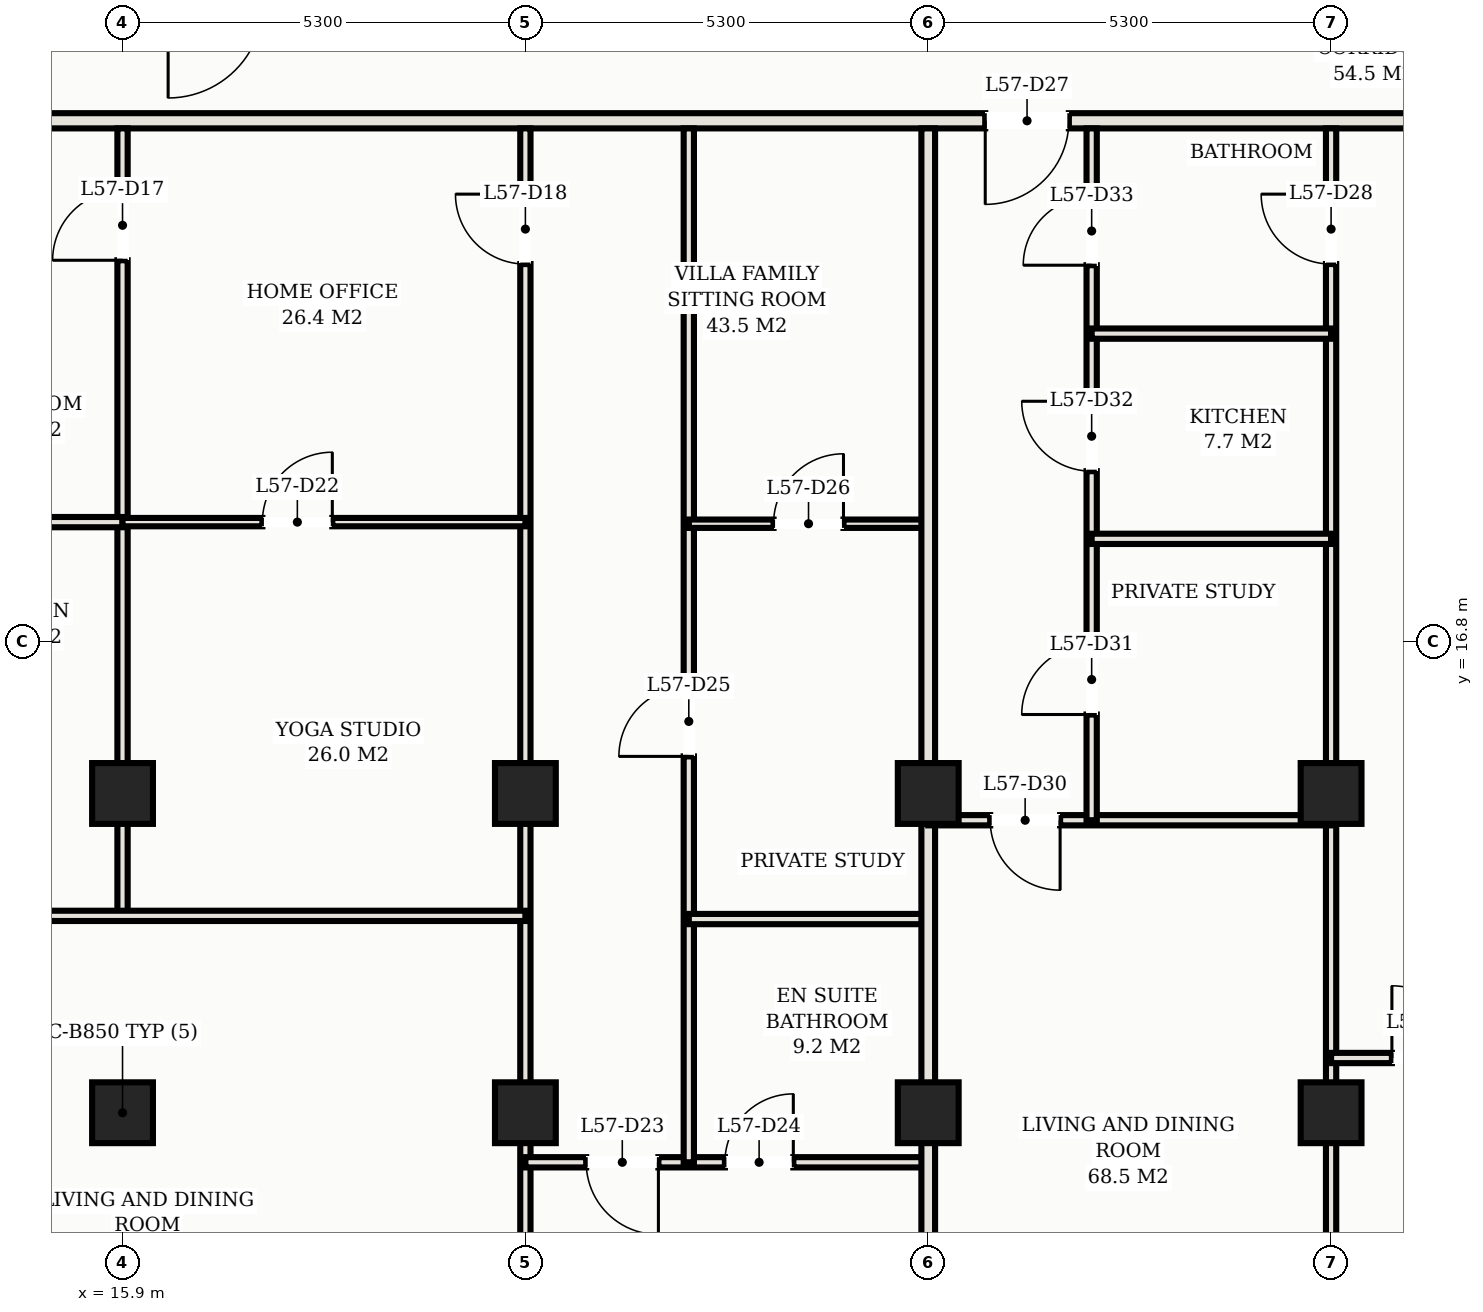
"""IFC4 building model, lengths in metres.
Left out: names, types, materials, properties, quantities, classifications, styles, units other than length and angle.
Written with IfcOpenShell. Run it as: python <this file> out.ifc"""

import sys

from ifc_helpers import new_model, si_unit, direction, frame, frame_2d, origin, origin_2d, place, context, subcontext, project, spatial, rectangle, hollow_rectangle, extrude, element, fill, save


model = new_model("IFC4")
c1 = context("Model", 3, precision=1e-05, world=origin(), true_north=direction((0.0, 1.0)))
c2 = subcontext(c1, "Body", "Model", "MODEL_VIEW")
j1 = project(units=[si_unit("LENGTHUNIT", "METRE"), si_unit("PLANEANGLEUNIT", "RADIAN")], contexts=[c1])
p1 = place(None, origin())
s1 = spatial("IfcSite", under=j1, at=p1, CompositionType="ELEMENT")
p2 = place(p1, origin())
s2 = spatial("IfcBuilding", under=s1, at=p2, CompositionType="ELEMENT")
p3 = place(p2, frame((0.0, 0.0, 209.9)))
s3 = spatial("IfcBuildingStorey", under=s2, at=p3, CompositionType="ELEMENT", Elevation=209.9)
for number, where, z_axis, x_axis in (
    (1, (15.9, 14.8, 0.0), (0.0, 0.0, 1.0), (1.0, 0.0, 0.0)),
    (2, (15.9, 10.6, 0.0), (0.0, 0.0, 1.0), (1.0, 0.0, 0.0)),
    (3, (21.2, 14.8, 0.0), (0.0, 0.0, 1.0), (1.0, 0.0, 0.0)),
    (4, (21.2, 10.6, 0.0), (0.0, 0.0, 1.0), (1.0, 0.0, 0.0)),
    (5, (26.5, 14.8, 0.0), (0.0, 0.0, 1.0), (1.0, 0.0, 0.0)),
    (6, (26.5, 10.6, 0.0), (0.0, 0.0, 1.0), (1.0, 0.0, 0.0)),
    (7, (31.8, 14.8, 0.0), (0.0, 0.0, 1.0), (1.0, 0.0, 0.0)),
    (8, (31.8, 10.6, 0.0), (0.0, 0.0, 1.0), (1.0, 0.0, 0.0)),
):
    element("IfcColumn", number, at=place(p3, frame(where, z_axis=z_axis, x_axis=x_axis)), inside=s3, PredefinedType="COLUMN", context=c2, shape_type="SweptSolid", body=[
        extrude(hollow_rectangle(XDim=0.8, YDim=0.8, WallThickness=0.028, at=origin_2d()), origin(), (0.0, 0.0, 1.0), 3.3),
    ])
p4 = place(p3, frame((6.72, 23.65, 0.0), z_axis=(0.0, 0.0, 1.0), x_axis=(1.0, 0.0, 0.0)))
e9 = element("IfcWall", 9, at=p4, inside=s3, PredefinedType="PARTITIONING", context=c2, shape_type="SweptSolid", body=[
    extrude(rectangle(XDim=39.56, YDim=0.2, at=frame_2d((19.78, 0.0))), origin(), (0.0, 0.0, 1.0), 2.43),
])
p5 = place(p4, frame((4.63, 0.0, 0.0)))
e10 = element("IfcOpeningElement", 10, at=p5, cuts=e9, PredefinedType="OPENING", context=c2, shape_type="SweptSolid", body=[
    extrude(rectangle(XDim=1.1, YDim=2.25, at=frame_2d((0.55, 1.125))), frame((0.0, 0.11, 0.0), z_axis=(0.0, -1.0, 0.0), x_axis=(1.0, 0.0, 0.0)), (0.0, 0.0, 1.0), 0.22),
])
p6 = place(p4, frame((20.53, 0.0, 0.0)))
e11 = element("IfcOpeningElement", 11, at=p6, cuts=e9, PredefinedType="OPENING", context=c2, shape_type="SweptSolid", body=[
    extrude(rectangle(XDim=1.1, YDim=2.25, at=frame_2d((0.55, 1.125))), frame((0.0, 0.11, 0.0), z_axis=(0.0, -1.0, 0.0), x_axis=(1.0, 0.0, 0.0)), (0.0, 0.0, 1.0), 0.22),
])
p7 = place(p4, frame((2.085, 0.0, 0.0)))
e12 = element("IfcOpeningElement", 12, at=p7, cuts=e9, PredefinedType="OPENING", context=c2, shape_type="SweptSolid", body=[
    extrude(rectangle(XDim=0.92, YDim=2.15, at=frame_2d((0.46, 1.075))), frame((0.0, 0.11, 0.0), z_axis=(0.0, -1.0, 0.0), x_axis=(1.0, 0.0, 0.0)), (0.0, 0.0, 1.0), 0.22),
])
p8 = place(p4, frame((36.555, 0.0, 0.0)))
e13 = element("IfcOpeningElement", 13, at=p8, cuts=e9, PredefinedType="OPENING", context=c2, shape_type="SweptSolid", body=[
    extrude(rectangle(XDim=0.92, YDim=2.15, at=frame_2d((0.46, 1.075))), frame((0.0, 0.11, 0.0), z_axis=(0.0, -1.0, 0.0), x_axis=(1.0, 0.0, 0.0)), (0.0, 0.0, 1.0), 0.22),
])
p9 = place(p3, frame((15.9, 14.8, 0.0), z_axis=(0.0, 0.0, 1.0), x_axis=(0.0, 1.0, 0.0)))
e14 = element("IfcWall", 14, at=p9, inside=s3, PredefinedType="PARTITIONING", context=c2, shape_type="SweptSolid", body=[
    extrude(rectangle(XDim=8.75, YDim=0.135, at=frame_2d((4.375, 0.0))), origin(), (0.0, 0.0, 1.0), 2.43),
])
p10 = place(p9, frame((7.015, 0.0, 0.0)))
e15 = element("IfcOpeningElement", 15, at=p10, cuts=e14, PredefinedType="OPENING", context=c2, shape_type="SweptSolid", body=[
    extrude(rectangle(XDim=0.92, YDim=2.15, at=frame_2d((0.46, 1.075))), frame((0.0, 0.078, 0.0), z_axis=(0.0, -1.0, 0.0), x_axis=(1.0, 0.0, 0.0)), (0.0, 0.0, 1.0), 0.155),
])
p11 = place(p3, frame((21.2, 5.331, 0.0), z_axis=(0.0, 0.0, 1.0), x_axis=(0.0, 1.0, 0.0)))
e16 = element("IfcWall", 16, at=p11, inside=s3, PredefinedType="PARTITIONING", context=c2, shape_type="SweptSolid", body=[
    extrude(rectangle(XDim=18.219, YDim=0.135, at=frame_2d((9.109, 0.0))), origin(), (0.0, 0.0, 1.0), 2.43),
])
p12 = place(p11, frame((16.434, 0.0, 0.0)))
e17 = element("IfcOpeningElement", 17, at=p12, cuts=e16, PredefinedType="OPENING", context=c2, shape_type="SweptSolid", body=[
    extrude(rectangle(XDim=0.92, YDim=2.15, at=frame_2d((0.46, 1.075))), frame((0.0, 0.078, 0.0), z_axis=(0.0, -1.0, 0.0), x_axis=(1.0, 0.0, 0.0)), (0.0, 0.0, 1.0), 0.155),
])
p13 = place(p3, frame((15.9, 13.19, 0.0), z_axis=(0.0, 0.0, 1.0), x_axis=(0.0, 1.0, 0.0)))
e18 = element("IfcWall", 18, at=p13, inside=s3, PredefinedType="PARTITIONING", context=c2, shape_type="SweptSolid", body=[
    extrude(rectangle(XDim=1.61, YDim=0.135, at=frame_2d((0.805, 0.0))), origin(), (0.0, 0.0, 1.0), 2.43),
])
p14 = place(p3, frame((10.6, 13.19, 0.0), z_axis=(0.0, 0.0, 1.0), x_axis=(1.0, 0.0, 0.0)))
e19 = element("IfcWall", 19, at=p14, inside=s3, PredefinedType="PARTITIONING", context=c2, shape_type="SweptSolid", body=[
    extrude(rectangle(XDim=10.6, YDim=0.135, at=frame_2d((5.3, 0.0))), origin(), (0.0, 0.0, 1.0), 2.43),
])
p15 = place(p14, frame((0.425, 0.0, 0.0)))
e20 = element("IfcOpeningElement", 20, at=p15, cuts=e19, PredefinedType="OPENING", context=c2, shape_type="SweptSolid", body=[
    extrude(rectangle(XDim=1.5, YDim=2.25, at=frame_2d((0.75, 1.125))), frame((0.0, 0.078, 0.0), z_axis=(0.0, -1.0, 0.0), x_axis=(1.0, 0.0, 0.0)), (0.0, 0.0, 1.0), 0.155),
])
p16 = place(p3, frame((12.95, 18.37, 0.0), z_axis=(0.0, 0.0, 1.0), x_axis=(1.0, 0.0, 0.0)))
e21 = element("IfcWall", 21, at=p16, inside=s3, PredefinedType="PARTITIONING", context=c2, shape_type="SweptSolid", body=[
    extrude(rectangle(XDim=2.95, YDim=0.135, at=frame_2d((1.475, 0.0))), origin(), (0.0, 0.0, 1.0), 2.43),
])
p17 = place(p3, frame((15.9, 18.37, 0.0), z_axis=(0.0, 0.0, 1.0), x_axis=(1.0, 0.0, 0.0)))
e22 = element("IfcWall", 22, at=p17, inside=s3, PredefinedType="MOVABLE", context=c2, shape_type="SweptSolid", body=[
    extrude(rectangle(XDim=5.3, YDim=0.11, at=frame_2d((2.65, 0.0))), origin(), (0.0, 0.0, 1.0), 2.43),
])
p18 = place(p17, frame((1.84, 0.0, 0.0)))
e23 = element("IfcOpeningElement", 23, at=p18, cuts=e22, PredefinedType="OPENING", context=c2, shape_type="SweptSolid", body=[
    extrude(rectangle(XDim=0.92, YDim=2.15, at=frame_2d((0.46, 1.075))), frame((0.0, 0.065, 0.0), z_axis=(0.0, -1.0, 0.0), x_axis=(1.0, 0.0, 0.0)), (0.0, 0.0, 1.0), 0.13),
])
p19 = place(p3, frame((21.2, 9.948, 0.0), z_axis=(0.0, 0.0, 1.0), x_axis=(1.0, 0.0, 0.0)))
e24 = element("IfcWall", 24, at=p19, inside=s3, PredefinedType="PARTITIONING", context=c2, shape_type="SweptSolid", body=[
    extrude(rectangle(XDim=5.3, YDim=0.135, at=frame_2d((2.65, 0.0))), origin(), (0.0, 0.0, 1.0), 2.43),
])
p20 = place(p19, frame((0.8, 0.0, 0.0)))
e25 = element("IfcOpeningElement", 25, at=p20, cuts=e24, PredefinedType="OPENING", context=c2, shape_type="SweptSolid", body=[
    extrude(rectangle(XDim=0.95, YDim=2.15, at=frame_2d((0.475, 1.075))), frame((0.0, 0.078, 0.0), z_axis=(0.0, -1.0, 0.0), x_axis=(1.0, 0.0, 0.0)), (0.0, 0.0, 1.0), 0.155),
])
p21 = place(p19, frame((2.625, 0.0, 0.0)))
e26 = element("IfcOpeningElement", 26, at=p21, cuts=e24, PredefinedType="OPENING", context=c2, shape_type="SweptSolid", body=[
    extrude(rectangle(XDim=0.9, YDim=2.15, at=frame_2d((0.45, 1.075))), frame((0.0, 0.078, 0.0), z_axis=(0.0, -1.0, 0.0), x_axis=(1.0, 0.0, 0.0)), (0.0, 0.0, 1.0), 0.155),
])
p22 = place(p3, frame((23.35, 9.948, 0.0), z_axis=(0.0, 0.0, 1.0), x_axis=(0.0, 1.0, 0.0)))
e27 = element("IfcWall", 27, at=p22, inside=s3, PredefinedType="PARTITIONING", context=c2, shape_type="SweptSolid", body=[
    extrude(rectangle(XDim=13.602, YDim=0.135, at=frame_2d((6.801, 0.0))), origin(), (0.0, 0.0, 1.0), 2.43),
])
p23 = place(p22, frame((5.34, 0.0, 0.0)))
e28 = element("IfcOpeningElement", 28, at=p23, cuts=e27, PredefinedType="OPENING", context=c2, shape_type="SweptSolid", body=[
    extrude(rectangle(XDim=0.92, YDim=2.15, at=frame_2d((0.46, 1.075))), frame((0.0, 0.078, 0.0), z_axis=(0.0, -1.0, 0.0), x_axis=(1.0, 0.0, 0.0)), (0.0, 0.0, 1.0), 0.155),
])
p24 = place(p3, frame((23.35, 13.148, 0.0), z_axis=(0.0, 0.0, 1.0), x_axis=(1.0, 0.0, 0.0)))
e29 = element("IfcWall", 29, at=p24, inside=s3, PredefinedType="PARTITIONING", context=c2, shape_type="SweptSolid", body=[
    extrude(rectangle(XDim=3.15, YDim=0.135, at=frame_2d((1.575, 0.0))), origin(), (0.0, 0.0, 1.0), 2.43),
])
p25 = place(p3, frame((23.35, 18.349, 0.0), z_axis=(0.0, 0.0, 1.0), x_axis=(1.0, 0.0, 0.0)))
e30 = element("IfcWall", 30, at=p25, inside=s3, PredefinedType="MOVABLE", context=c2, shape_type="SweptSolid", body=[
    extrude(rectangle(XDim=3.15, YDim=0.11, at=frame_2d((1.575, 0.0))), origin(), (0.0, 0.0, 1.0), 2.43),
])
p26 = place(p25, frame((1.115, 0.0, 0.0)))
e31 = element("IfcOpeningElement", 31, at=p26, cuts=e30, PredefinedType="OPENING", context=c2, shape_type="SweptSolid", body=[
    extrude(rectangle(XDim=0.92, YDim=2.15, at=frame_2d((0.46, 1.075))), frame((0.0, 0.065, 0.0), z_axis=(0.0, -1.0, 0.0), x_axis=(1.0, 0.0, 0.0)), (0.0, 0.0, 1.0), 0.13),
])
p27 = place(p3, frame((26.5, 4.42, 0.0), z_axis=(0.0, 0.0, 1.0), x_axis=(0.0, 1.0, 0.0)))
e32 = element("IfcWall", 32, at=p27, inside=s3, PredefinedType="PARTITIONING", context=c2, shape_type="SweptSolid", body=[
    extrude(rectangle(XDim=19.13, YDim=0.18, at=frame_2d((9.565, 0.0))), origin(), (0.0, 0.0, 1.0), 2.43),
])
p28 = place(p3, frame((31.8, 5.331, 0.0), z_axis=(0.0, 0.0, 1.0), x_axis=(0.0, 1.0, 0.0)))
e33 = element("IfcWall", 33, at=p28, inside=s3, PredefinedType="PARTITIONING", context=c2, shape_type="SweptSolid", body=[
    extrude(rectangle(XDim=18.219, YDim=0.135, at=frame_2d((9.109, 0.0))), origin(), (0.0, 0.0, 1.0), 2.43),
])
p29 = place(p28, frame((16.434, 0.0, 0.0)))
e34 = element("IfcOpeningElement", 34, at=p29, cuts=e33, PredefinedType="OPENING", context=c2, shape_type="SweptSolid", body=[
    extrude(rectangle(XDim=0.92, YDim=2.15, at=frame_2d((0.46, 1.075))), frame((0.0, 0.078, 0.0), z_axis=(0.0, -1.0, 0.0), x_axis=(1.0, 0.0, 0.0)), (0.0, 0.0, 1.0), 0.155),
])
p30 = place(p3, frame((26.5, 14.448, 0.0), z_axis=(0.0, 0.0, 1.0), x_axis=(1.0, 0.0, 0.0)))
e35 = element("IfcWall", 35, at=p30, inside=s3, PredefinedType="PARTITIONING", context=c2, shape_type="SweptSolid", body=[
    extrude(rectangle(XDim=5.3, YDim=0.135, at=frame_2d((2.65, 0.0))), origin(), (0.0, 0.0, 1.0), 2.43),
])
p31 = place(p30, frame((0.815, 0.0, 0.0)))
e36 = element("IfcOpeningElement", 36, at=p31, cuts=e35, PredefinedType="OPENING", context=c2, shape_type="SweptSolid", body=[
    extrude(rectangle(XDim=0.92, YDim=2.15, at=frame_2d((0.46, 1.075))), frame((0.0, 0.078, 0.0), z_axis=(0.0, -1.0, 0.0), x_axis=(1.0, 0.0, 0.0)), (0.0, 0.0, 1.0), 0.155),
])
p32 = place(p3, frame((28.65, 14.448, 0.0), z_axis=(0.0, 0.0, 1.0), x_axis=(0.0, 1.0, 0.0)))
e37 = element("IfcWall", 37, at=p32, inside=s3, PredefinedType="PARTITIONING", context=c2, shape_type="SweptSolid", body=[
    extrude(rectangle(XDim=9.102, YDim=0.135, at=frame_2d((4.551, 0.0))), origin(), (0.0, 0.0, 1.0), 2.43),
])
p33 = place(p32, frame((1.391, 0.0, 0.0)))
e38 = element("IfcOpeningElement", 38, at=p33, cuts=e37, PredefinedType="OPENING", context=c2, shape_type="SweptSolid", body=[
    extrude(rectangle(XDim=0.92, YDim=2.15, at=frame_2d((0.46, 1.075))), frame((0.0, 0.078, 0.0), z_axis=(0.0, -1.0, 0.0), x_axis=(1.0, 0.0, 0.0)), (0.0, 0.0, 1.0), 0.155),
])
p34 = place(p32, frame((4.592, 0.0, 0.0)))
e39 = element("IfcOpeningElement", 39, at=p34, cuts=e37, PredefinedType="OPENING", context=c2, shape_type="SweptSolid", body=[
    extrude(rectangle(XDim=0.92, YDim=2.15, at=frame_2d((0.46, 1.075))), frame((0.0, 0.078, 0.0), z_axis=(0.0, -1.0, 0.0), x_axis=(1.0, 0.0, 0.0)), (0.0, 0.0, 1.0), 0.155),
])
p35 = place(p32, frame((7.302, 0.0, 0.0)))
e40 = element("IfcOpeningElement", 40, at=p35, cuts=e37, PredefinedType="OPENING", context=c2, shape_type="SweptSolid", body=[
    extrude(rectangle(XDim=0.9, YDim=2.15, at=frame_2d((0.45, 1.075))), frame((0.0, 0.078, 0.0), z_axis=(0.0, -1.0, 0.0), x_axis=(1.0, 0.0, 0.0)), (0.0, 0.0, 1.0), 0.155),
])
for number, where, z_axis, x_axis in (
    (41, (28.65, 18.15, 0.0), (0.0, 0.0, 1.0), (1.0, 0.0, 0.0)),
    (42, (28.65, 20.85, 0.0), (0.0, 0.0, 1.0), (1.0, 0.0, 0.0)),
):
    element("IfcWall", number, at=place(p3, frame(where, z_axis=z_axis, x_axis=x_axis)), inside=s3, PredefinedType="PARTITIONING", context=c2, shape_type="SweptSolid", body=[
        extrude(rectangle(XDim=3.15, YDim=0.135, at=frame_2d((1.575, 0.0))), origin(), (0.0, 0.0, 1.0), 2.43),
    ])
p36 = place(p3, frame((31.8, 11.32, 0.0), z_axis=(0.0, 0.0, 1.0), x_axis=(1.0, 0.0, 0.0)))
e43 = element("IfcWall", 43, at=p36, inside=s3, PredefinedType="PARTITIONING", context=c2, shape_type="SweptSolid", body=[
    extrude(rectangle(XDim=5.3, YDim=0.135, at=frame_2d((2.65, 0.0))), origin(), (0.0, 0.0, 1.0), 2.43),
])
p37 = place(p36, frame((0.8, 0.0, 0.0)))
e44 = element("IfcOpeningElement", 44, at=p37, cuts=e43, PredefinedType="OPENING", context=c2, shape_type="SweptSolid", body=[
    extrude(rectangle(XDim=0.95, YDim=2.15, at=frame_2d((0.475, 1.075))), frame((0.0, 0.078, 0.0), z_axis=(0.0, -1.0, 0.0), x_axis=(1.0, 0.0, 0.0)), (0.0, 0.0, 1.0), 0.155),
])
p38 = place(p36, frame((2.875, 0.0, 0.0)))
e45 = element("IfcOpeningElement", 45, at=p38, cuts=e43, PredefinedType="OPENING", context=c2, shape_type="SweptSolid", body=[
    extrude(rectangle(XDim=0.9, YDim=2.15, at=frame_2d((0.45, 1.075))), frame((0.0, 0.078, 0.0), z_axis=(0.0, -1.0, 0.0), x_axis=(1.0, 0.0, 0.0)), (0.0, 0.0, 1.0), 0.155),
])
p39 = place(p10, origin())
e46 = element("IfcDoor", 46, at=p39, inside=s3, OperationType="SINGLE_SWING_LEFT", PredefinedType="DOOR", context=c2, shape_type="SweptSolid", body=[
    extrude(rectangle(XDim=0.92, YDim=2.15, at=frame_2d((0.46, 1.075))), frame((0.0, 0.025, 0.0), z_axis=(0.0, -1.0, 0.0), x_axis=(1.0, 0.0, 0.0)), (0.0, 0.0, 1.0), 0.05),
])
fill(e15, e46)
p40 = place(p12, origin())
e47 = element("IfcDoor", 47, at=p40, inside=s3, OperationType="SINGLE_SWING_RIGHT", PredefinedType="DOOR", context=c2, shape_type="SweptSolid", body=[
    extrude(rectangle(XDim=0.92, YDim=2.15, at=frame_2d((0.46, 1.075))), frame((0.0, 0.025, 0.0), z_axis=(0.0, -1.0, 0.0), x_axis=(1.0, 0.0, 0.0)), (0.0, 0.0, 1.0), 0.05),
])
fill(e17, e47)
p41 = place(p18, origin())
e48 = element("IfcDoor", 48, at=p41, inside=s3, OperationType="SINGLE_SWING_RIGHT", PredefinedType="DOOR", context=c2, shape_type="SweptSolid", body=[
    extrude(rectangle(XDim=0.92, YDim=2.15, at=frame_2d((0.46, 1.075))), frame((0.0, 0.025, 0.0), z_axis=(0.0, -1.0, 0.0), x_axis=(1.0, 0.0, 0.0)), (0.0, 0.0, 1.0), 0.05),
])
fill(e23, e48)
p42 = place(p20, frame((0.95, 0.0, 0.0), z_axis=(0.0, 0.0, 1.0), x_axis=(-1.0, 0.0, 0.0)))
e49 = element("IfcDoor", 49, at=p42, inside=s3, OperationType="SINGLE_SWING_LEFT", PredefinedType="DOOR", context=c2, shape_type="SweptSolid", body=[
    extrude(rectangle(XDim=0.95, YDim=2.15, at=frame_2d((0.475, 1.075))), frame((0.0, 0.025, 0.0), z_axis=(0.0, -1.0, 0.0), x_axis=(1.0, 0.0, 0.0)), (0.0, 0.0, 1.0), 0.05),
])
fill(e25, e49)
p43 = place(p21, origin())
e50 = element("IfcDoor", 50, at=p43, inside=s3, OperationType="SINGLE_SWING_RIGHT", PredefinedType="DOOR", context=c2, shape_type="SweptSolid", body=[
    extrude(rectangle(XDim=0.9, YDim=2.15, at=frame_2d((0.45, 1.075))), frame((0.0, 0.025, 0.0), z_axis=(0.0, -1.0, 0.0), x_axis=(1.0, 0.0, 0.0)), (0.0, 0.0, 1.0), 0.05),
])
fill(e26, e50)
p44 = place(p23, origin())
e51 = element("IfcDoor", 51, at=p44, inside=s3, OperationType="SINGLE_SWING_LEFT", PredefinedType="DOOR", context=c2, shape_type="SweptSolid", body=[
    extrude(rectangle(XDim=0.92, YDim=2.15, at=frame_2d((0.46, 1.075))), frame((0.0, 0.025, 0.0), z_axis=(0.0, -1.0, 0.0), x_axis=(1.0, 0.0, 0.0)), (0.0, 0.0, 1.0), 0.05),
])
fill(e28, e51)
p45 = place(p26, origin())
e52 = element("IfcDoor", 52, at=p45, inside=s3, OperationType="SINGLE_SWING_RIGHT", PredefinedType="DOOR", context=c2, shape_type="SweptSolid", body=[
    extrude(rectangle(XDim=0.92, YDim=2.15, at=frame_2d((0.46, 1.075))), frame((0.0, 0.025, 0.0), z_axis=(0.0, -1.0, 0.0), x_axis=(1.0, 0.0, 0.0)), (0.0, 0.0, 1.0), 0.05),
])
fill(e31, e52)
p46 = place(p6, frame((1.1, 0.0, 0.0), z_axis=(0.0, 0.0, 1.0), x_axis=(-1.0, 0.0, 0.0)))
e53 = element("IfcDoor", 53, at=p46, inside=s3, OperationType="SINGLE_SWING_RIGHT", PredefinedType="DOOR", context=c2, shape_type="SweptSolid", body=[
    extrude(rectangle(XDim=1.1, YDim=2.25, at=frame_2d((0.55, 1.125))), frame((0.0, 0.025, 0.0), z_axis=(0.0, -1.0, 0.0), x_axis=(1.0, 0.0, 0.0)), (0.0, 0.0, 1.0), 0.05),
])
fill(e11, e53)
p47 = place(p29, origin())
e54 = element("IfcDoor", 54, at=p47, inside=s3, OperationType="SINGLE_SWING_RIGHT", PredefinedType="DOOR", context=c2, shape_type="SweptSolid", body=[
    extrude(rectangle(XDim=0.92, YDim=2.15, at=frame_2d((0.46, 1.075))), frame((0.0, 0.025, 0.0), z_axis=(0.0, -1.0, 0.0), x_axis=(1.0, 0.0, 0.0)), (0.0, 0.0, 1.0), 0.05),
])
fill(e34, e54)
p48 = place(p31, frame((0.92, 0.0, 0.0), z_axis=(0.0, 0.0, 1.0), x_axis=(-1.0, 0.0, 0.0)))
e55 = element("IfcDoor", 55, at=p48, inside=s3, OperationType="SINGLE_SWING_LEFT", PredefinedType="DOOR", context=c2, shape_type="SweptSolid", body=[
    extrude(rectangle(XDim=0.92, YDim=2.15, at=frame_2d((0.46, 1.075))), frame((0.0, 0.025, 0.0), z_axis=(0.0, -1.0, 0.0), x_axis=(1.0, 0.0, 0.0)), (0.0, 0.0, 1.0), 0.05),
])
fill(e36, e55)
p49 = place(p33, origin())
e56 = element("IfcDoor", 56, at=p49, inside=s3, OperationType="SINGLE_SWING_LEFT", PredefinedType="DOOR", context=c2, shape_type="SweptSolid", body=[
    extrude(rectangle(XDim=0.92, YDim=2.15, at=frame_2d((0.46, 1.075))), frame((0.0, 0.025, 0.0), z_axis=(0.0, -1.0, 0.0), x_axis=(1.0, 0.0, 0.0)), (0.0, 0.0, 1.0), 0.05),
])
fill(e38, e56)
p50 = place(p34, origin())
e57 = element("IfcDoor", 57, at=p50, inside=s3, OperationType="SINGLE_SWING_RIGHT", PredefinedType="DOOR", context=c2, shape_type="SweptSolid", body=[
    extrude(rectangle(XDim=0.92, YDim=2.15, at=frame_2d((0.46, 1.075))), frame((0.0, 0.025, 0.0), z_axis=(0.0, -1.0, 0.0), x_axis=(1.0, 0.0, 0.0)), (0.0, 0.0, 1.0), 0.05),
])
fill(e39, e57)
p51 = place(p35, origin())
e58 = element("IfcDoor", 58, at=p51, inside=s3, OperationType="SINGLE_SWING_LEFT", PredefinedType="DOOR", context=c2, shape_type="SweptSolid", body=[
    extrude(rectangle(XDim=0.9, YDim=2.15, at=frame_2d((0.45, 1.075))), frame((0.0, 0.025, 0.0), z_axis=(0.0, -1.0, 0.0), x_axis=(1.0, 0.0, 0.0)), (0.0, 0.0, 1.0), 0.05),
])
fill(e40, e58)
p52 = place(p37, origin())
e59 = element("IfcDoor", 59, at=p52, inside=s3, OperationType="SINGLE_SWING_LEFT", PredefinedType="DOOR", context=c2, shape_type="SweptSolid", body=[
    extrude(rectangle(XDim=0.95, YDim=2.15, at=frame_2d((0.475, 1.075))), frame((0.0, 0.025, 0.0), z_axis=(0.0, -1.0, 0.0), x_axis=(1.0, 0.0, 0.0)), (0.0, 0.0, 1.0), 0.05),
])
fill(e44, e59)
save(model, sys.argv[1])
